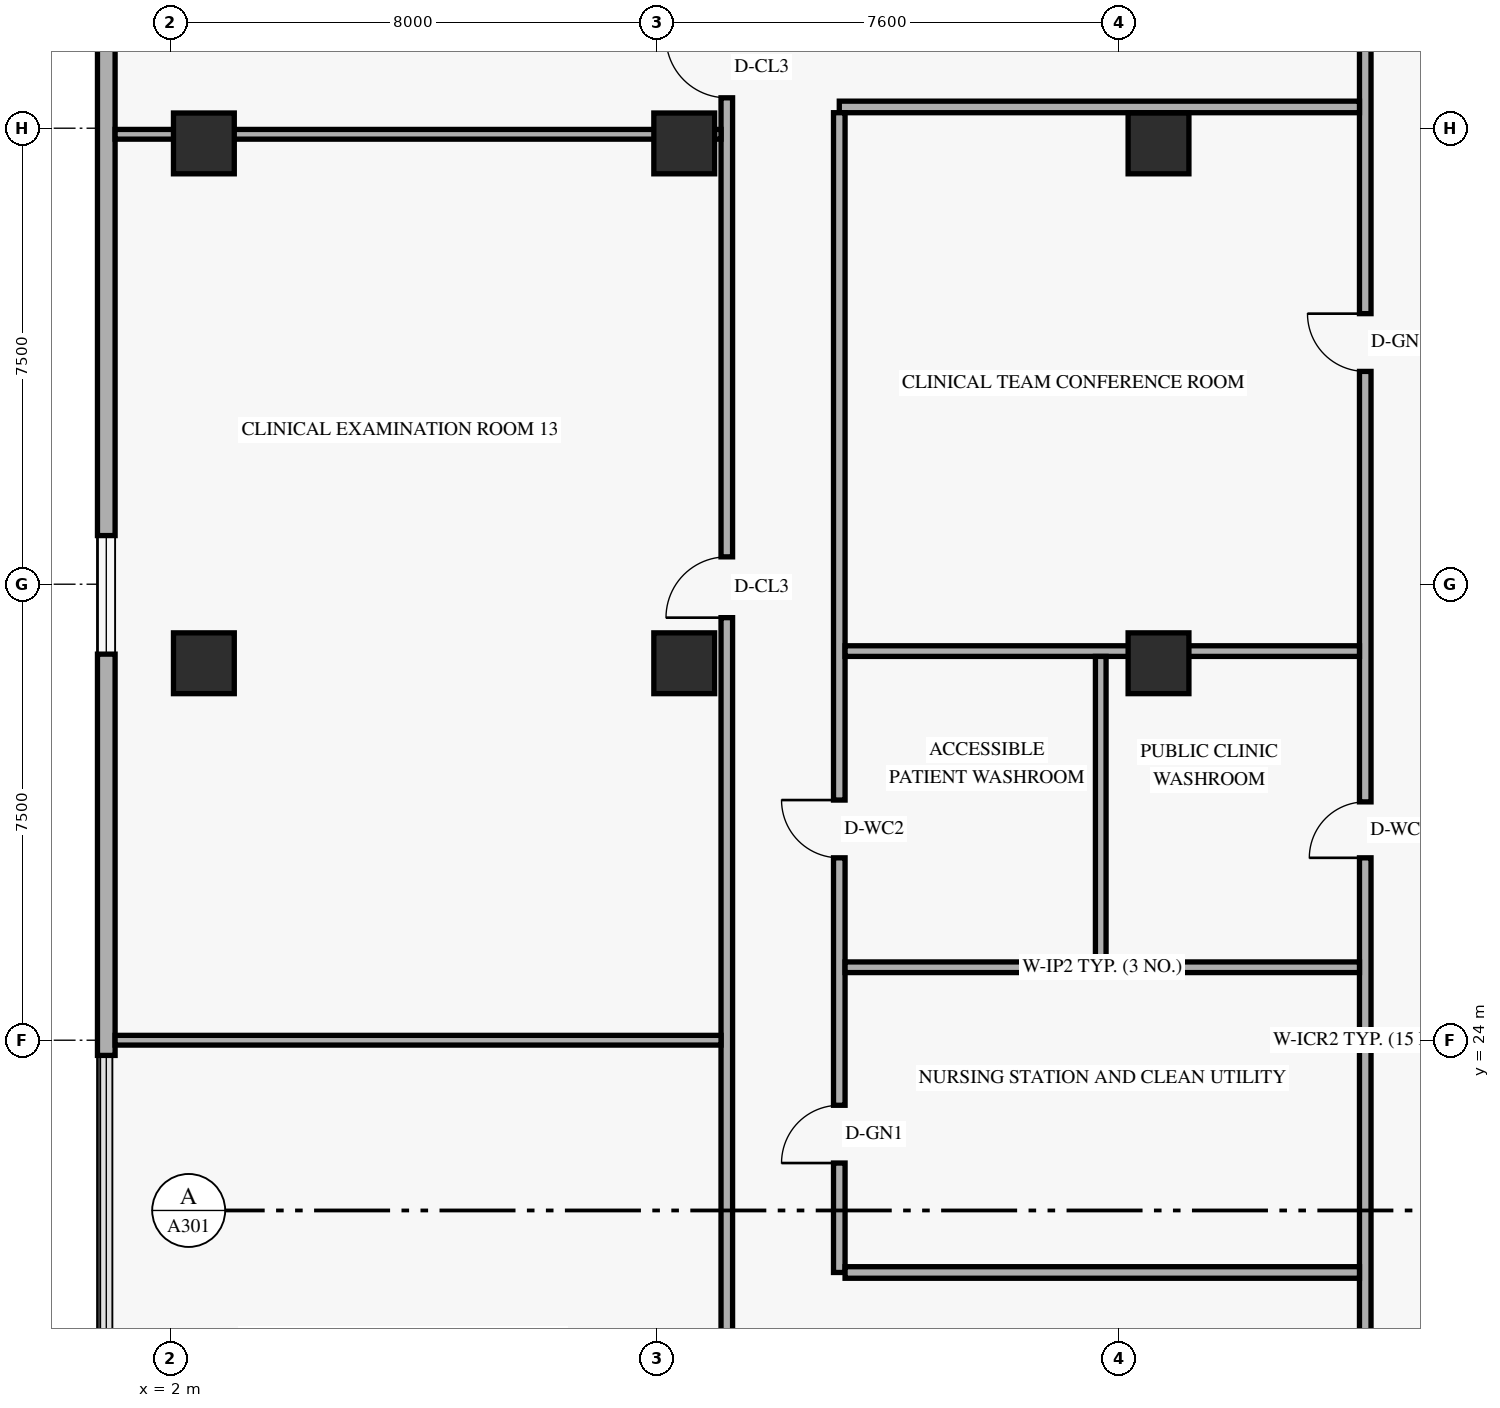
"""IFC4 building model, lengths in metres.
Left out: names, types, materials, properties, quantities, classifications, styles, units other than length and angle.
Written with IfcOpenShell. Run it as: python <this file> out.ifc"""

import sys

from ifc_helpers import new_model, si_unit, direction, frame, frame_2d, origin, origin_2d, place, context, subcontext, project, spatial, rectangle, extrude, element, fill, save


model = new_model("IFC4")
c1 = context("Model", 3, precision=1e-05, world=origin(), true_north=direction((0.0, 1.0)))
c2 = subcontext(c1, "Body", "Model", "MODEL_VIEW")
j1 = project(units=[si_unit("LENGTHUNIT", "METRE"), si_unit("PLANEANGLEUNIT", "RADIAN")], contexts=[c1])
p1 = place(None, origin())
s1 = spatial("IfcSite", under=j1, at=p1, CompositionType="ELEMENT")
p2 = place(p1, origin())
s2 = spatial("IfcBuilding", under=s1, at=p2, CompositionType="ELEMENT")
p3 = place(p2, frame((0.0, 0.0, 4.8)))
s3 = spatial("IfcBuildingStorey", under=s2, at=p3, CompositionType="ELEMENT", Elevation=4.8)
for number, where, z_axis, x_axis in (
    (1, (2.55, 30.2, 0.0), (0.0, 0.0, 1.0), (1.0, 0.0, 0.0)),
    (2, (2.55, 38.75, 0.0), (0.0, 0.0, 1.0), (1.0, 0.0, 0.0)),
    (3, (10.45, 30.2, 0.0), (0.0, 0.0, 1.0), (1.0, 0.0, 0.0)),
    (4, (10.45, 38.75, 0.0), (0.0, 0.0, 1.0), (1.0, 0.0, 0.0)),
    (5, (18.25, 30.2, 0.0), (0.0, 0.0, 1.0), (1.0, 0.0, 0.0)),
    (6, (18.25, 38.75, 0.0), (0.0, 0.0, 1.0), (1.0, 0.0, 0.0)),
):
    element("IfcColumn", number, at=place(p3, frame(where, z_axis=z_axis, x_axis=x_axis)), inside=s3, PredefinedType="COLUMN", context=c2, shape_type="SweptSolid", body=[
        extrude(rectangle(XDim=1.0, YDim=1.0, at=origin_2d()), origin(), (0.0, 0.0, 1.0), 4.8),
    ])
p4 = place(p3, frame((0.945, 43.98, 0.0), z_axis=(0.0, 0.0, 1.0), x_axis=(0.0, -1.0, 0.0)))
e7 = element("IfcWall", 7, at=p4, inside=s3, PredefinedType="SOLIDWALL", context=c2, shape_type="SweptSolid", body=[
    extrude(rectangle(XDim=20.23, YDim=0.29, at=frame_2d((10.115, 0.0))), origin(), (0.0, 0.0, 1.0), 4.52),
])
p5 = place(p4, frame((11.68, 0.0, 0.85)))
e8 = element("IfcOpeningElement", 8, at=p5, cuts=e7, PredefinedType="OPENING", context=c2, shape_type="SweptSolid", body=[
    extrude(rectangle(XDim=1.95, YDim=1.75, at=frame_2d((0.975, 0.875))), frame((0.0, 0.155, 0.0), z_axis=(0.0, -1.0, 0.0), x_axis=(1.0, 0.0, 0.0)), (0.0, 0.0, 1.0), 0.31),
])
p6 = place(p4, frame((1.565, 0.0, 0.85)))
e9 = element("IfcOpeningElement", 9, at=p6, cuts=e7, PredefinedType="OPENING", context=c2, shape_type="SweptSolid", body=[
    extrude(rectangle(XDim=1.95, YDim=1.75, at=frame_2d((0.975, 0.875))), frame((0.0, 0.155, 0.0), z_axis=(0.0, -1.0, 0.0), x_axis=(1.0, 0.0, 0.0)), (0.0, 0.0, 1.0), 0.31),
])
p7 = place(p3, frame((21.65, 6.8, 0.0), z_axis=(0.0, 0.0, 1.0), x_axis=(0.0, 1.0, 0.0)))
e10 = element("IfcWall", 10, at=p7, inside=s3, PredefinedType="STANDARD", context=c2, shape_type="SweptSolid", body=[
    extrude(rectangle(XDim=34.4, YDim=0.19, at=frame_2d((17.2, 0.0))), origin(), (0.0, 0.0, 1.0), 3.502),
])
p8 = place(p7, frame((20.2, 0.0, 0.0)))
e11 = element("IfcOpeningElement", 11, at=p8, cuts=e10, PredefinedType="OPENING", context=c2, shape_type="SweptSolid", body=[
    extrude(rectangle(XDim=0.92, YDim=2.14, at=frame_2d((0.46, 1.07))), frame((0.0, 0.105, 0.0), z_axis=(0.0, -1.0, 0.0), x_axis=(1.0, 0.0, 0.0)), (0.0, 0.0, 1.0), 0.21),
])
p9 = place(p7, frame((28.2, 0.0, 0.0)))
e12 = element("IfcOpeningElement", 12, at=p9, cuts=e10, PredefinedType="OPENING", context=c2, shape_type="SweptSolid", body=[
    extrude(rectangle(XDim=0.95, YDim=2.15, at=frame_2d((0.475, 1.075))), frame((0.0, 0.105, 0.0), z_axis=(0.0, -1.0, 0.0), x_axis=(1.0, 0.0, 0.0)), (0.0, 0.0, 1.0), 0.21),
])
p10 = place(p7, frame((6.0, 0.0, 0.0)))
e13 = element("IfcOpeningElement", 13, at=p10, cuts=e10, PredefinedType="OPENING", context=c2, shape_type="SweptSolid", body=[
    extrude(rectangle(XDim=0.9, YDim=2.1, at=frame_2d((0.45, 1.05))), frame((0.0, 0.105, 0.0), z_axis=(0.0, -1.0, 0.0), x_axis=(1.0, 0.0, 0.0)), (0.0, 0.0, 1.0), 0.21),
])
p11 = place(p3, frame((13.0, 39.35, 0.0), z_axis=(0.0, 0.0, 1.0), x_axis=(1.0, 0.0, 0.0)))
e14 = element("IfcWall", 14, at=p11, inside=s3, PredefinedType="STANDARD", context=c2, shape_type="SweptSolid", body=[
    extrude(rectangle(XDim=8.555, YDim=0.19, at=frame_2d((4.277, 0.0))), origin(), (0.0, 0.0, 1.0), 3.732),
])
p12 = place(p3, frame((11.15, 4.695, 0.0), z_axis=(0.0, 0.0, 1.0), x_axis=(0.0, 1.0, 0.0)))
e15 = element("IfcWall", 15, at=p12, inside=s3, PredefinedType="STANDARD", context=c2, shape_type="SweptSolid", body=[
    extrude(rectangle(XDim=38.61, YDim=0.19, at=frame_2d((19.305, 0.0))), origin(), (0.0, 0.0, 1.0), 3.502),
])
p13 = place(p12, frame((2.755, 0.0, 0.0)))
e16 = element("IfcOpeningElement", 16, at=p13, cuts=e15, PredefinedType="OPENING", context=c2, shape_type="SweptSolid", body=[
    extrude(rectangle(XDim=1.0, YDim=2.15, at=frame_2d((0.5, 1.075))), frame((0.0, 0.105, 0.0), z_axis=(0.0, -1.0, 0.0), x_axis=(1.0, 0.0, 0.0)), (0.0, 0.0, 1.0), 0.21),
])
p14 = place(p12, frame((11.215, 0.0, 0.0)))
e17 = element("IfcOpeningElement", 17, at=p14, cuts=e15, PredefinedType="OPENING", context=c2, shape_type="SweptSolid", body=[
    extrude(rectangle(XDim=1.0, YDim=2.15, at=frame_2d((0.5, 1.075))), frame((0.0, 0.105, 0.0), z_axis=(0.0, -1.0, 0.0), x_axis=(1.0, 0.0, 0.0)), (0.0, 0.0, 1.0), 0.21),
])
p15 = place(p12, frame((26.255, 0.0, 0.0)))
e18 = element("IfcOpeningElement", 18, at=p15, cuts=e15, PredefinedType="OPENING", context=c2, shape_type="SweptSolid", body=[
    extrude(rectangle(XDim=1.0, YDim=2.15, at=frame_2d((0.5, 1.075))), frame((0.0, 0.105, 0.0), z_axis=(0.0, -1.0, 0.0), x_axis=(1.0, 0.0, 0.0)), (0.0, 0.0, 1.0), 0.21),
])
p16 = place(p12, frame((34.805, 0.0, 0.0)))
e19 = element("IfcOpeningElement", 19, at=p16, cuts=e15, PredefinedType="OPENING", context=c2, shape_type="SweptSolid", body=[
    extrude(rectangle(XDim=1.0, YDim=2.15, at=frame_2d((0.5, 1.075))), frame((0.0, 0.105, 0.0), z_axis=(0.0, -1.0, 0.0), x_axis=(1.0, 0.0, 0.0)), (0.0, 0.0, 1.0), 0.21),
])
p17 = place(p3, frame((13.0, 20.18, 0.0), z_axis=(0.0, 0.0, 1.0), x_axis=(0.0, 1.0, 0.0)))
e20 = element("IfcWall", 20, at=p17, inside=s3, PredefinedType="STANDARD", context=c2, shape_type="SweptSolid", body=[
    extrude(rectangle(XDim=19.075, YDim=0.19, at=frame_2d((9.538, 0.0))), origin(), (0.0, 0.0, 1.0), 3.502),
])
p18 = place(p17, frame((1.8, 0.0, 0.0)))
e21 = element("IfcOpeningElement", 21, at=p18, cuts=e20, PredefinedType="OPENING", context=c2, shape_type="SweptSolid", body=[
    extrude(rectangle(XDim=0.95, YDim=2.15, at=frame_2d((0.475, 1.075))), frame((0.0, 0.105, 0.0), z_axis=(0.0, -1.0, 0.0), x_axis=(1.0, 0.0, 0.0)), (0.0, 0.0, 1.0), 0.21),
])
p19 = place(p17, frame((6.82, 0.0, 0.0)))
e22 = element("IfcOpeningElement", 22, at=p19, cuts=e20, PredefinedType="OPENING", context=c2, shape_type="SweptSolid", body=[
    extrude(rectangle(XDim=0.95, YDim=2.14, at=frame_2d((0.475, 1.07))), frame((0.0, 0.105, 0.0), z_axis=(0.0, -1.0, 0.0), x_axis=(1.0, 0.0, 0.0)), (0.0, 0.0, 1.0), 0.21),
])
p20 = place(p3, frame((13.095, 20.18, 0.0), z_axis=(0.0, 0.0, 1.0), x_axis=(1.0, 0.0, 0.0)))
e23 = element("IfcWall", 23, at=p20, inside=s3, PredefinedType="STANDARD", context=c2, shape_type="SweptSolid", body=[
    extrude(rectangle(XDim=8.46, YDim=0.19, at=frame_2d((4.23, 0.0))), origin(), (0.0, 0.0, 1.0), 3.732),
])
p21 = place(p3, frame((1.09, 24.0, 0.0), z_axis=(0.0, 0.0, 1.0), x_axis=(1.0, 0.0, 0.0)))
e24 = element("IfcWall", 24, at=p21, inside=s3, PredefinedType="PARTITIONING", context=c2, shape_type="SweptSolid", body=[
    extrude(rectangle(XDim=9.965, YDim=0.16, at=frame_2d((4.982, 0.0))), origin(), (0.0, 0.0, 1.0), 3.732),
])
p22 = place(p3, frame((1.09, 38.9, 0.0), z_axis=(0.0, 0.0, 1.0), x_axis=(1.0, 0.0, 0.0)))
e25 = element("IfcWall", 25, at=p22, inside=s3, PredefinedType="PARTITIONING", context=c2, shape_type="SweptSolid", body=[
    extrude(rectangle(XDim=9.965, YDim=0.16, at=frame_2d((4.982, 0.0))), origin(), (0.0, 0.0, 1.0), 3.502),
])
p23 = place(p3, frame((13.095, 25.2, 0.0), z_axis=(0.0, 0.0, 1.0), x_axis=(1.0, 0.0, 0.0)))
e26 = element("IfcWall", 26, at=p23, inside=s3, PredefinedType="PLUMBINGWALL", context=c2, shape_type="SweptSolid", body=[
    extrude(rectangle(XDim=8.46, YDim=0.175, at=frame_2d((4.23, 0.0))), origin(), (0.0, 0.0, 1.0), 3.732),
])
p24 = place(p3, frame((13.095, 30.4, 0.0), z_axis=(0.0, 0.0, 1.0), x_axis=(1.0, 0.0, 0.0)))
e27 = element("IfcWall", 27, at=p24, inside=s3, PredefinedType="PLUMBINGWALL", context=c2, shape_type="SweptSolid", body=[
    extrude(rectangle(XDim=8.46, YDim=0.175, at=frame_2d((4.23, 0.0))), origin(), (0.0, 0.0, 1.0), 3.502),
])
p25 = place(p3, frame((17.3, 25.288, 0.0), z_axis=(0.0, 0.0, 1.0), x_axis=(0.0, 1.0, 0.0)))
e28 = element("IfcWall", 28, at=p25, inside=s3, PredefinedType="PLUMBINGWALL", context=c2, shape_type="SweptSolid", body=[
    extrude(rectangle(XDim=5.025, YDim=0.175, at=frame_2d((2.512, 0.0))), origin(), (0.0, 0.0, 1.0), 3.502),
])
p26 = place(p5, origin())
e29 = element("IfcWindow", 29, at=p26, inside=s3, PartitioningType="SINGLE_PANEL", PredefinedType="WINDOW", context=c2, shape_type="SweptSolid", body=[
    extrude(rectangle(XDim=1.95, YDim=1.75, at=frame_2d((0.975, 0.875))), frame((0.0, 0.03, 0.0), z_axis=(0.0, -1.0, 0.0), x_axis=(1.0, 0.0, 0.0)), (0.0, 0.0, 1.0), 0.06),
])
fill(e8, e29)
p27 = place(p15, origin())
e30 = element("IfcDoor", 30, at=p27, inside=s3, OperationType="SINGLE_SWING_LEFT", PredefinedType="DOOR", context=c2, shape_type="SweptSolid", body=[
    extrude(rectangle(XDim=1.0, YDim=2.15, at=frame_2d((0.5, 1.075))), frame((0.0, 0.025, 0.0), z_axis=(0.0, -1.0, 0.0), x_axis=(1.0, 0.0, 0.0)), (0.0, 0.0, 1.0), 0.05),
])
fill(e18, e30)
p28 = place(p16, origin())
e31 = element("IfcDoor", 31, at=p28, inside=s3, OperationType="SINGLE_SWING_RIGHT", PredefinedType="DOOR", context=c2, shape_type="SweptSolid", body=[
    extrude(rectangle(XDim=1.0, YDim=2.15, at=frame_2d((0.5, 1.075))), frame((0.0, 0.025, 0.0), z_axis=(0.0, -1.0, 0.0), x_axis=(1.0, 0.0, 0.0)), (0.0, 0.0, 1.0), 0.05),
])
fill(e19, e31)
p29 = place(p18, origin())
e32 = element("IfcDoor", 32, at=p29, inside=s3, OperationType="SINGLE_SWING_LEFT", PredefinedType="DOOR", context=c2, shape_type="SweptSolid", body=[
    extrude(rectangle(XDim=0.95, YDim=2.15, at=frame_2d((0.475, 1.075))), frame((0.0, 0.025, 0.0), z_axis=(0.0, -1.0, 0.0), x_axis=(1.0, 0.0, 0.0)), (0.0, 0.0, 1.0), 0.05),
])
fill(e21, e32)
p30 = place(p19, origin())
e33 = element("IfcDoor", 33, at=p30, inside=s3, OperationType="SINGLE_SWING_RIGHT", PredefinedType="DOOR", context=c2, shape_type="SweptSolid", body=[
    extrude(rectangle(XDim=0.95, YDim=2.14, at=frame_2d((0.475, 1.07))), frame((0.0, 0.025, 0.0), z_axis=(0.0, -1.0, 0.0), x_axis=(1.0, 0.0, 0.0)), (0.0, 0.0, 1.0), 0.05),
])
fill(e22, e33)
p31 = place(p8, origin())
e34 = element("IfcDoor", 34, at=p31, inside=s3, OperationType="SINGLE_SWING_LEFT", PredefinedType="DOOR", context=c2, shape_type="SweptSolid", body=[
    extrude(rectangle(XDim=0.92, YDim=2.14, at=frame_2d((0.46, 1.07))), frame((0.0, 0.025, 0.0), z_axis=(0.0, -1.0, 0.0), x_axis=(1.0, 0.0, 0.0)), (0.0, 0.0, 1.0), 0.05),
])
fill(e11, e34)
p32 = place(p9, origin())
e35 = element("IfcDoor", 35, at=p32, inside=s3, OperationType="SINGLE_SWING_RIGHT", PredefinedType="DOOR", context=c2, shape_type="SweptSolid", body=[
    extrude(rectangle(XDim=0.95, YDim=2.15, at=frame_2d((0.475, 1.075))), frame((0.0, 0.025, 0.0), z_axis=(0.0, -1.0, 0.0), x_axis=(1.0, 0.0, 0.0)), (0.0, 0.0, 1.0), 0.05),
])
fill(e12, e35)
save(model, sys.argv[1])
